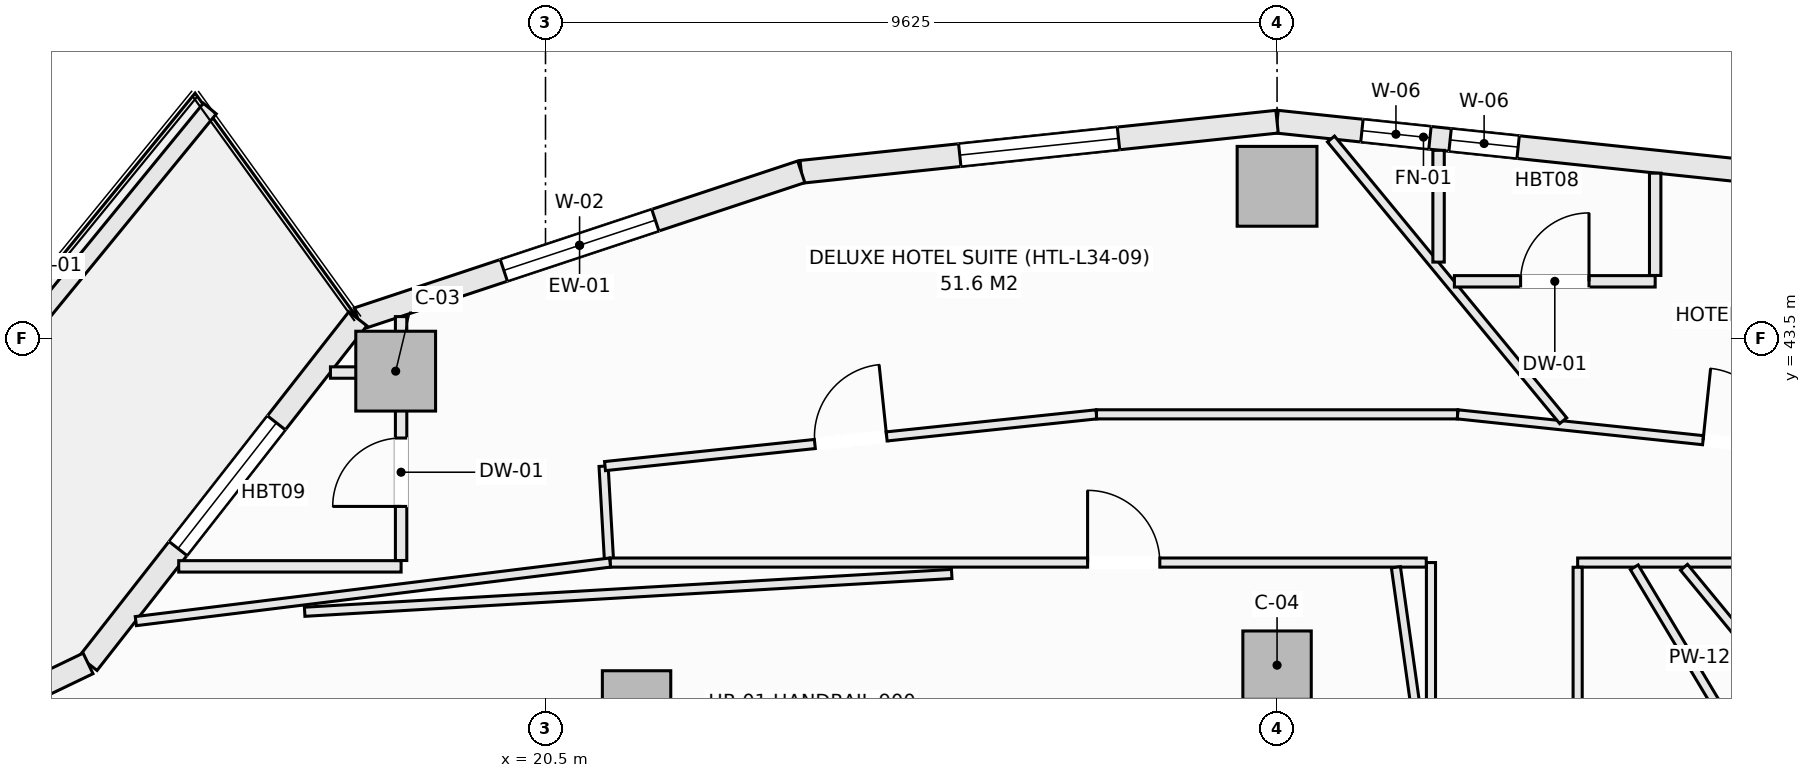
"""IFC4 building model, lengths in metres.
Left out: names, types, materials, properties, quantities, classifications, styles, units other than length and angle.
Written with IfcOpenShell. Run it as: python <this file> out.ifc"""

import sys

from ifc_helpers import new_model, si_unit, direction, frame, frame_2d, origin, origin_2d, place, context, subcontext, project, spatial, rectangle, extrude, element, fill, save


model = new_model("IFC4")
c1 = context("Model", 3, precision=1e-05, world=origin(), true_north=direction((0.0, 1.0)))
c2 = subcontext(c1, "Body", "Model", "MODEL_VIEW")
j1 = project(units=[si_unit("LENGTHUNIT", "METRE"), si_unit("PLANEANGLEUNIT", "RADIAN")], contexts=[c1])
p1 = place(None, origin())
s1 = spatial("IfcSite", under=j1, at=p1, CompositionType="ELEMENT")
p2 = place(p1, origin())
s2 = spatial("IfcBuilding", under=s1, at=p2, CompositionType="ELEMENT")
p3 = place(p2, frame((0.0, 0.0, 135.9)))
s3 = spatial("IfcBuildingStorey", under=s2, at=p3, CompositionType="ELEMENT", Elevation=135.9)
for number, where, z_axis, x_axis in (
    (1, (30.125, 45.5, -0.27), (0.0, 0.0, 1.0), (1.0, 0.0, 0.0)),
    (2, (18.529, 43.068, -0.27), (0.0, 0.0, 1.0), (1.0, 0.0, 0.0)),
):
    element("IfcColumn", number, at=place(p3, frame(where, z_axis=z_axis, x_axis=x_axis)), inside=s3, PredefinedType="COLUMN", context=c2, shape_type="SweptSolid", body=[
        extrude(rectangle(XDim=1.05, YDim=1.05, at=origin_2d()), origin(), (0.0, 0.0, 1.0), 3.4),
    ])
for number, where, z_axis, x_axis in (
    (3, (30.125, 39.2, -0.27), (0.0, 0.0, 1.0), (1.0, 0.0, 0.0)),
    (4, (21.698, 38.677, -0.27), (0.0, 0.0, 1.0), (1.0, 0.0, 0.0)),
):
    element("IfcColumn", number, at=place(p3, frame(where, z_axis=z_axis, x_axis=x_axis)), inside=s3, PredefinedType="COLUMN", context=c2, shape_type="SweptSolid", body=[
        extrude(rectangle(XDim=0.9, YDim=0.9, at=origin_2d()), origin(), (0.0, 0.0, 1.0), 3.4),
    ])
p4 = place(p3, frame((30.125, 46.35, 0.0), z_axis=(0.0, 0.0, 1.0), x_axis=(0.994498012394, -0.104755445421, 0.0)))
e5 = element("IfcWall", 5, at=p4, inside=s3, PredefinedType="SOLIDWALL", context=c2, shape_type="SweptSolid", body=[
    extrude(rectangle(XDim=6.295, YDim=0.3, at=frame_2d((3.147, 0.0))), origin(), (0.0, 0.0, 1.0), 2.653),
])
p5 = place(p4, frame((1.123, 0.0, 0.74)))
e6 = element("IfcOpeningElement", 6, at=p5, cuts=e5, PredefinedType="OPENING", context=c2, shape_type="SweptSolid", body=[
    extrude(rectangle(XDim=0.9, YDim=1.7, at=frame_2d((0.45, 0.85))), frame((0.0, 0.16, 0.0), z_axis=(0.0, -1.0, 0.0), x_axis=(1.0, 0.0, 0.0)), (0.0, 0.0, 1.0), 0.32),
])
p6 = place(p4, frame((2.289, 0.0, 0.74)))
e7 = element("IfcOpeningElement", 7, at=p6, cuts=e5, PredefinedType="OPENING", context=c2, shape_type="SweptSolid", body=[
    extrude(rectangle(XDim=0.9, YDim=1.7, at=frame_2d((0.45, 0.85))), frame((0.0, 0.16, 0.0), z_axis=(0.0, -1.0, 0.0), x_axis=(1.0, 0.0, 0.0)), (0.0, 0.0, 1.0), 0.32),
])
p7 = place(p3, frame((23.865, 45.691, 0.0), z_axis=(0.0, 0.0, 1.0), x_axis=(0.994498012394, 0.104755445421, 0.0)))
e8 = element("IfcWall", 8, at=p7, inside=s3, PredefinedType="SOLIDWALL", context=c2, shape_type="SweptSolid", body=[
    extrude(rectangle(XDim=6.295, YDim=0.3, at=frame_2d((3.147, 0.0))), origin(), (0.0, 0.0, 1.0), 2.653),
])
p8 = place(p7, frame((2.097, 0.0, 0.74)))
e9 = element("IfcOpeningElement", 9, at=p8, cuts=e8, PredefinedType="OPENING", context=c2, shape_type="SweptSolid", body=[
    extrude(rectangle(XDim=2.1, YDim=1.7, at=frame_2d((1.05, 0.85))), frame((0.0, 0.16, 0.0), z_axis=(0.0, -1.0, 0.0), x_axis=(1.0, 0.0, 0.0)), (0.0, 0.0, 1.0), 0.32),
])
p9 = place(p3, frame((18.031, 43.758, 0.0), z_axis=(0.0, 0.0, 1.0), x_axis=(0.949238009374, 0.314558741032, 0.0)))
e10 = element("IfcWall", 10, at=p9, inside=s3, PredefinedType="SOLIDWALL", context=c2, shape_type="SweptSolid", body=[
    extrude(rectangle(XDim=6.146, YDim=0.3, at=frame_2d((3.073, 0.0))), origin(), (0.0, 0.0, 1.0), 2.653),
])
p10 = place(p9, frame((2.023, 0.0, 0.74)))
e11 = element("IfcOpeningElement", 11, at=p10, cuts=e10, PredefinedType="OPENING", context=c2, shape_type="SweptSolid", body=[
    extrude(rectangle(XDim=2.1, YDim=1.7, at=frame_2d((1.05, 0.85))), frame((0.0, 0.16, 0.0), z_axis=(0.0, -1.0, 0.0), x_axis=(1.0, 0.0, 0.0)), (0.0, 0.0, 1.0), 0.32),
])
p11 = place(p3, frame((14.481, 39.223, 0.0), z_axis=(0.0, 0.0, 1.0), x_axis=(0.616435134162, 0.787405693001, 0.0)))
e12 = element("IfcWall", 12, at=p11, inside=s3, PredefinedType="SOLIDWALL", context=c2, shape_type="SweptSolid", body=[
    extrude(rectangle(XDim=5.759, YDim=0.3, at=frame_2d((2.879, 0.0))), origin(), (0.0, 0.0, 1.0), 2.653),
])
p12 = place(p11, frame((1.92, 0.0, 0.74)))
e13 = element("IfcOpeningElement", 13, at=p12, cuts=e12, PredefinedType="OPENING", context=c2, shape_type="SweptSolid", body=[
    extrude(rectangle(XDim=2.1, YDim=1.7, at=frame_2d((1.05, 0.85))), frame((0.0, 0.16, 0.0), z_axis=(0.0, -1.0, 0.0), x_axis=(1.0, 0.0, 0.0)), (0.0, 0.0, 1.0), 0.32),
])
p13 = place(p3, frame((9.178, 36.675, 0.0), z_axis=(0.0, 0.0, 1.0), x_axis=(0.901370184739, 0.433049408339, 0.0)))
e14 = element("IfcWall", 14, at=p13, inside=s3, PredefinedType="SOLIDWALL", context=c2, shape_type="SweptSolid", body=[
    extrude(rectangle(XDim=5.884, YDim=0.3, at=frame_2d((2.942, 0.0))), origin(), (0.0, 0.0, 1.0), 2.653),
])
p14 = place(p13, frame((2.042, 0.0, 0.0)))
e15 = element("IfcOpeningElement", 15, at=p14, cuts=e14, PredefinedType="OPENING", context=c2, shape_type="SweptSolid", body=[
    extrude(rectangle(XDim=1.8, YDim=2.25, at=frame_2d((0.9, 1.125))), frame((0.0, 0.16, 0.0), z_axis=(0.0, -1.0, 0.0), x_axis=(1.0, 0.0, 0.0)), (0.0, 0.0, 1.0), 0.32),
])
p15 = place(p3, frame((11.791, 41.274, 0.0), z_axis=(0.0, 0.0, 1.0), x_axis=(0.633024046468, 0.774132131224, 0.0)))
e16 = element("IfcWall", 16, at=p15, inside=s3, PredefinedType="PARAPET", context=c2, shape_type="SweptSolid", body=[
    extrude(rectangle(XDim=6.781, YDim=0.22, at=frame_2d((3.39, 0.0))), origin(), (0.0, 0.0, 1.0), 0.52),
])
p16 = place(p3, frame((21.264, 41.818, 0.0), z_axis=(0.0, 0.0, 1.0), x_axis=(0.0574492264, -0.99834842935, 0.0)))
e17 = element("IfcWall", 17, at=p16, inside=s3, PredefinedType="PARTITIONING", context=c2, shape_type="SweptSolid", body=[
    extrude(rectangle(XDim=1.271, YDim=0.12, at=frame_2d((0.635, 0.0))), origin(), (0.0, 0.0, 1.0), 3.13),
])
p17 = place(p3, frame((32.15, 35.812, 0.0), z_axis=(0.0, 0.0, 1.0), x_axis=(0.0, 1.0, 0.0)))
e18 = element("IfcWall", 18, at=p17, inside=s3, PredefinedType="PARTITIONING", context=c2, shape_type="SweptSolid", body=[
    extrude(rectangle(XDim=4.738, YDim=0.12, at=frame_2d((2.369, 0.0))), origin(), (0.0, 0.0, 1.0), 3.13),
])
p18 = place(p3, frame((21.351, 40.55, 0.0), z_axis=(0.0, 0.0, 1.0), x_axis=(1.0, 0.0, 0.0)))
e19 = element("IfcWall", 19, at=p18, inside=s3, PredefinedType="PARTITIONING", context=c2, shape_type="SweptSolid", body=[
    extrude(rectangle(XDim=10.737, YDim=0.12, at=frame_2d((5.369, 0.0))), origin(), (0.0, 0.0, 1.0), 3.13),
])
p19 = place(p18, frame((6.282, 0.0, 0.0)))
e20 = element("IfcOpeningElement", 20, at=p19, cuts=e19, PredefinedType="OPENING", context=c2, shape_type="SweptSolid", body=[
    extrude(rectangle(XDim=0.95, YDim=2.1, at=frame_2d((0.475, 1.05))), frame((0.0, 0.07, 0.0), z_axis=(0.0, -1.0, 0.0), x_axis=(1.0, 0.0, 0.0)), (0.0, 0.0, 1.0), 0.14),
])
p20 = place(p3, frame((34.08, 40.55, 0.0), z_axis=(0.0, 0.0, 1.0), x_axis=(1.0, 0.0, 0.0)))
e21 = element("IfcWall", 21, at=p20, inside=s3, PredefinedType="PARTITIONING", context=c2, shape_type="SweptSolid", body=[
    extrude(rectangle(XDim=4.82, YDim=0.12, at=frame_2d((2.41, 0.0))), origin(), (0.0, 0.0, 1.0), 3.13),
])
p21 = place(p20, frame((2.368, 0.0, 0.0)))
e22 = element("IfcOpeningElement", 22, at=p21, cuts=e21, PredefinedType="OPENING", context=c2, shape_type="SweptSolid", body=[
    extrude(rectangle(XDim=0.95, YDim=2.1, at=frame_2d((0.475, 1.05))), frame((0.0, 0.07, 0.0), z_axis=(0.0, -1.0, 0.0), x_axis=(1.0, 0.0, 0.0)), (0.0, 0.0, 1.0), 0.14),
])
p22 = place(p3, frame((21.283, 41.819, 0.0), z_axis=(0.0, 0.0, 1.0), x_axis=(0.994501131299, 0.104725831799, 0.0)))
e23 = element("IfcWall", 23, at=p22, inside=s3, PredefinedType="PARTITIONING", context=c2, shape_type="SweptSolid", body=[
    extrude(rectangle(XDim=6.502, YDim=0.12, at=frame_2d((3.251, 0.0))), origin(), (0.0, 0.0, 1.0), 3.13),
])
p23 = place(p22, frame((2.776, 0.0, 0.0)))
e24 = element("IfcOpeningElement", 24, at=p23, cuts=e23, PredefinedType="OPENING", context=c2, shape_type="SweptSolid", body=[
    extrude(rectangle(XDim=0.95, YDim=2.1, at=frame_2d((0.475, 1.05))), frame((0.0, 0.07, 0.0), z_axis=(0.0, -1.0, 0.0), x_axis=(1.0, 0.0, 0.0)), (0.0, 0.0, 1.0), 0.14),
])
p24 = place(p3, frame((27.749, 42.5, 0.0), z_axis=(0.0, 0.0, 1.0), x_axis=(1.0, 0.0, 0.0)))
e25 = element("IfcWall", 25, at=p24, inside=s3, PredefinedType="PARTITIONING", context=c2, shape_type="SweptSolid", body=[
    extrude(rectangle(XDim=4.752, YDim=0.12, at=frame_2d((2.376, 0.0))), origin(), (0.0, 0.0, 1.0), 3.13),
])
p25 = place(p3, frame((32.501, 42.5, 0.0), z_axis=(0.0, 0.0, 1.0), x_axis=(0.994501131299, -0.104725831799, 0.0)))
e26 = element("IfcWall", 26, at=p25, inside=s3, PredefinedType="PARTITIONING", context=c2, shape_type="SweptSolid", body=[
    extrude(rectangle(XDim=6.502, YDim=0.12, at=frame_2d((3.251, 0.0))), origin(), (0.0, 0.0, 1.0), 3.13),
])
p26 = place(p25, frame((3.247, 0.0, 0.0)))
e27 = element("IfcOpeningElement", 27, at=p26, cuts=e26, PredefinedType="OPENING", context=c2, shape_type="SweptSolid", body=[
    extrude(rectangle(XDim=0.95, YDim=2.1, at=frame_2d((0.475, 1.05))), frame((0.0, 0.07, 0.0), z_axis=(0.0, -1.0, 0.0), x_axis=(1.0, 0.0, 0.0)), (0.0, 0.0, 1.0), 0.14),
])
p27 = place(p3, frame((34.08, 35.812, 0.0), z_axis=(0.0, 0.0, 1.0), x_axis=(0.0, 1.0, 0.0)))
e28 = element("IfcWall", 28, at=p27, inside=s3, PredefinedType="PARTITIONING", context=c2, shape_type="SweptSolid", body=[
    extrude(rectangle(XDim=4.676, YDim=0.12, at=frame_2d((2.338, 0.0))), origin(), (0.0, 0.0, 1.0), 2.812),
])
p28 = place(p3, frame((34.825, 40.488, 0.0), z_axis=(0.0, 0.0, 1.0), x_axis=(0.513579710685, -0.85804188754, 0.0)))
e29 = element("IfcWall", 29, at=p28, inside=s3, PredefinedType="PARTITIONING", context=c2, shape_type="SweptSolid", body=[
    extrude(rectangle(XDim=5.45, YDim=0.12, at=frame_2d((2.725, 0.0))), origin(), (0.0, 0.0, 1.0), 3.13),
])
p29 = place(p3, frame((30.835, 46.122, 0.0), z_axis=(0.0, 0.0, 1.0), x_axis=(0.636070633964, -0.771630836999, 0.0)))
e30 = element("IfcWall", 30, at=p29, inside=s3, PredefinedType="PARTITIONING", context=c2, shape_type="SweptSolid", body=[
    extrude(rectangle(XDim=4.803, YDim=0.12, at=frame_2d((2.402, 0.0))), origin(), (0.0, 0.0, 1.0), 2.653),
])
p30 = place(p3, frame((35.479, 40.488, 0.0), z_axis=(0.0, 0.0, 1.0), x_axis=(0.636055982797, -0.771642914014, 0.0)))
e31 = element("IfcWall", 31, at=p30, inside=s3, PredefinedType="PARTITIONING", context=c2, shape_type="SweptSolid", body=[
    extrude(rectangle(XDim=26.473, YDim=0.12, at=frame_2d((13.236, 0.0))), origin(), (0.0, 0.0, 1.0), 2.812),
])
p31 = place(p3, frame((32.458, 44.25, 0.0), z_axis=(0.0, 0.0, 1.0), x_axis=(1.0, 0.0, 0.0)))
e32 = element("IfcWall", 32, at=p31, inside=s3, PredefinedType="PARTITIONING", context=c2, shape_type="SweptSolid", body=[
    extrude(rectangle(XDim=2.642, YDim=0.15, at=frame_2d((1.321, 0.0))), origin(), (0.0, 0.0, 1.0), 3.13),
])
p32 = place(p31, frame((0.871, 0.0, 0.0)))
e33 = element("IfcOpeningElement", 33, at=p32, cuts=e32, PredefinedType="OPENING", context=c2, shape_type="SweptSolid", body=[
    extrude(rectangle(XDim=0.9, YDim=2.1, at=frame_2d((0.45, 1.05))), frame((0.0, 0.085, 0.0), z_axis=(0.0, -1.0, 0.0), x_axis=(1.0, 0.0, 0.0)), (0.0, 0.0, 1.0), 0.17),
])
p33 = place(p3, frame((35.1, 44.327, 0.0), z_axis=(0.0, 0.0, 1.0), x_axis=(0.0, 1.0, 0.0)))
e34 = element("IfcWall", 34, at=p33, inside=s3, PredefinedType="PARTITIONING", context=c2, shape_type="SweptSolid", body=[
    extrude(rectangle(XDim=1.346, YDim=0.15, at=frame_2d((0.673, 0.0))), origin(), (0.0, 0.0, 1.0), 3.13),
])
p34 = place(p3, frame((32.25, 44.503, 0.0), z_axis=(0.0, 0.0, 1.0), x_axis=(0.0, 1.0, 0.0)))
e35 = element("IfcWall", 35, at=p34, inside=s3, PredefinedType="PARTITIONING", context=c2, shape_type="SweptSolid", body=[
    extrude(rectangle(XDim=1.47, YDim=0.15, at=frame_2d((0.735, 0.0))), origin(), (0.0, 0.0, 1.0), 3.13),
])
p35 = place(p3, frame((15.674, 40.5, 0.0), z_axis=(0.0, 0.0, 1.0), x_axis=(1.0, 0.0, 0.0)))
e36 = element("IfcWall", 36, at=p35, inside=s3, PredefinedType="PARTITIONING", context=c2, shape_type="SweptSolid", body=[
    extrude(rectangle(XDim=2.926, YDim=0.15, at=frame_2d((1.463, 0.0))), origin(), (0.0, 0.0, 1.0), 3.13),
])
p36 = place(p3, frame((18.6, 40.577, 0.0), z_axis=(0.0, 0.0, 1.0), x_axis=(0.0, 1.0, 0.0)))
e37 = element("IfcWall", 37, at=p36, inside=s3, PredefinedType="PARTITIONING", context=c2, shape_type="SweptSolid", body=[
    extrude(rectangle(XDim=3.209, YDim=0.15, at=frame_2d((1.604, 0.0))), origin(), (0.0, 0.0, 1.0), 2.505),
])
p37 = place(p36, frame((0.711, 0.0, 0.0)))
e38 = element("IfcOpeningElement", 38, at=p37, cuts=e37, PredefinedType="OPENING", context=c2, shape_type="SweptSolid", body=[
    extrude(rectangle(XDim=0.9, YDim=2.1, at=frame_2d((0.45, 1.05))), frame((0.0, 0.085, 0.0), z_axis=(0.0, -1.0, 0.0), x_axis=(1.0, 0.0, 0.0)), (0.0, 0.0, 1.0), 0.17),
])
p38 = place(p3, frame((17.67, 43.05, 0.0), z_axis=(0.0, 0.0, 1.0), x_axis=(1.0, 0.0, 0.0)))
e39 = element("IfcWall", 39, at=p38, inside=s3, PredefinedType="PARTITIONING", context=c2, shape_type="SweptSolid", body=[
    extrude(rectangle(XDim=0.853, YDim=0.15, at=frame_2d((0.426, 0.0))), origin(), (0.0, 0.0, 1.0), 2.653),
])
p39 = place(p3, frame((15.11, 39.78, 0.0), z_axis=(0.0, 0.0, 1.0), x_axis=(0.992465524728, 0.122524210773, 0.0)))
e40 = element("IfcWall", 40, at=p39, inside=s3, PredefinedType="PARTITIONING", context=c2, shape_type="SweptSolid", body=[
    extrude(rectangle(XDim=6.287, YDim=0.12, at=frame_2d((3.143, 0.0))), origin(), (0.0, 0.0, 1.0), 3.13),
])
p40 = place(p3, frame((17.331, 39.903, 0.0), z_axis=(0.0, 0.0, 1.0), x_axis=(0.998298083041, 0.0583175565, 0.0)))
e41 = element("IfcWall", 41, at=p40, inside=s3, PredefinedType="PARTITIONING", context=c2, shape_type="SweptSolid", body=[
    extrude(rectangle(XDim=8.528, YDim=0.12, at=frame_2d((4.264, 0.0))), origin(), (0.0, 0.0, 1.0), 3.13),
])
p41 = place(p3, frame((31.689, 40.488, 0.0), z_axis=(0.0, 0.0, 1.0), x_axis=(0.139205728255, -0.990263482726, 0.0)))
e42 = element("IfcWall", 42, at=p41, inside=s3, PredefinedType="PARTITIONING", context=c2, shape_type="SweptSolid", body=[
    extrude(rectangle(XDim=2.438, YDim=0.12, at=frame_2d((1.219, 0.0))), origin(), (0.0, 0.0, 1.0), 3.13),
])
p42 = place(p5, origin())
e43 = element("IfcWindow", 43, at=p42, inside=s3, PartitioningType="SINGLE_PANEL", PredefinedType="WINDOW", context=c2, shape_type="SweptSolid", body=[
    extrude(rectangle(XDim=0.9, YDim=1.7, at=frame_2d((0.45, 0.85))), frame((0.0, 0.03, 0.0), z_axis=(0.0, -1.0, 0.0), x_axis=(1.0, 0.0, 0.0)), (0.0, 0.0, 1.0), 0.06),
])
fill(e6, e43)
p43 = place(p8, origin())
e44 = element("IfcWindow", 44, at=p43, inside=s3, PartitioningType="SINGLE_PANEL", PredefinedType="WINDOW", context=c2, shape_type="SweptSolid", body=[
    extrude(rectangle(XDim=2.1, YDim=1.7, at=frame_2d((1.05, 0.85))), frame((0.0, 0.03, 0.0), z_axis=(0.0, -1.0, 0.0), x_axis=(1.0, 0.0, 0.0)), (0.0, 0.0, 1.0), 0.06),
])
fill(e9, e44)
p44 = place(p10, origin())
e45 = element("IfcWindow", 45, at=p44, inside=s3, PartitioningType="SINGLE_PANEL", PredefinedType="WINDOW", context=c2, shape_type="SweptSolid", body=[
    extrude(rectangle(XDim=2.1, YDim=1.7, at=frame_2d((1.05, 0.85))), frame((0.0, 0.03, 0.0), z_axis=(0.0, -1.0, 0.0), x_axis=(1.0, 0.0, 0.0)), (0.0, 0.0, 1.0), 0.06),
])
fill(e11, e45)
p45 = place(p12, origin())
e46 = element("IfcWindow", 46, at=p45, inside=s3, PartitioningType="SINGLE_PANEL", PredefinedType="WINDOW", context=c2, shape_type="SweptSolid", body=[
    extrude(rectangle(XDim=2.1, YDim=1.7, at=frame_2d((1.05, 0.85))), frame((0.0, 0.03, 0.0), z_axis=(0.0, -1.0, 0.0), x_axis=(1.0, 0.0, 0.0)), (0.0, 0.0, 1.0), 0.06),
])
fill(e13, e46)
p46 = place(p26, origin())
e47 = element("IfcDoor", 47, at=p46, inside=s3, OperationType="SINGLE_SWING_LEFT", PredefinedType="DOOR", context=c2, shape_type="SweptSolid", body=[
    extrude(rectangle(XDim=0.95, YDim=2.1, at=frame_2d((0.475, 1.05))), frame((0.0, 0.025, 0.0), z_axis=(0.0, -1.0, 0.0), x_axis=(1.0, 0.0, 0.0)), (0.0, 0.0, 1.0), 0.05),
])
fill(e27, e47)
p47 = place(p23, origin())
e48 = element("IfcDoor", 48, at=p47, inside=s3, OperationType="SINGLE_SWING_RIGHT", PredefinedType="DOOR", context=c2, shape_type="SweptSolid", body=[
    extrude(rectangle(XDim=0.95, YDim=2.1, at=frame_2d((0.475, 1.05))), frame((0.0, 0.025, 0.0), z_axis=(0.0, -1.0, 0.0), x_axis=(1.0, 0.0, 0.0)), (0.0, 0.0, 1.0), 0.05),
])
fill(e24, e48)
p48 = place(p19, origin())
e49 = element("IfcDoor", 49, at=p48, inside=s3, OperationType="SINGLE_SWING_LEFT", PredefinedType="DOOR", context=c2, shape_type="SweptSolid", body=[
    extrude(rectangle(XDim=0.95, YDim=2.1, at=frame_2d((0.475, 1.05))), frame((0.0, 0.025, 0.0), z_axis=(0.0, -1.0, 0.0), x_axis=(1.0, 0.0, 0.0)), (0.0, 0.0, 1.0), 0.05),
])
fill(e20, e49)
p49 = place(p32, origin())
e50 = element("IfcDoor", 50, at=p49, inside=s3, OperationType="SINGLE_SWING_RIGHT", PredefinedType="DOOR", context=c2, shape_type="SweptSolid", body=[
    extrude(rectangle(XDim=0.9, YDim=2.1, at=frame_2d((0.45, 1.05))), frame((0.0, 0.025, 0.0), z_axis=(0.0, -1.0, 0.0), x_axis=(1.0, 0.0, 0.0)), (0.0, 0.0, 1.0), 0.05),
])
fill(e33, e50)
p50 = place(p37, origin())
e51 = element("IfcDoor", 51, at=p50, inside=s3, OperationType="SINGLE_SWING_LEFT", PredefinedType="DOOR", context=c2, shape_type="SweptSolid", body=[
    extrude(rectangle(XDim=0.9, YDim=2.1, at=frame_2d((0.45, 1.05))), frame((0.0, 0.025, 0.0), z_axis=(0.0, -1.0, 0.0), x_axis=(1.0, 0.0, 0.0)), (0.0, 0.0, 1.0), 0.05),
])
fill(e38, e51)
p51 = place(p6, origin())
e52 = element("IfcWindow", 52, at=p51, inside=s3, PartitioningType="SINGLE_PANEL", PredefinedType="WINDOW", context=c2, shape_type="SweptSolid", body=[
    extrude(rectangle(XDim=0.9, YDim=1.7, at=frame_2d((0.45, 0.85))), frame((0.0, 0.03, 0.0), z_axis=(0.0, -1.0, 0.0), x_axis=(1.0, 0.0, 0.0)), (0.0, 0.0, 1.0), 0.06),
])
fill(e7, e52)
save(model, sys.argv[1])
